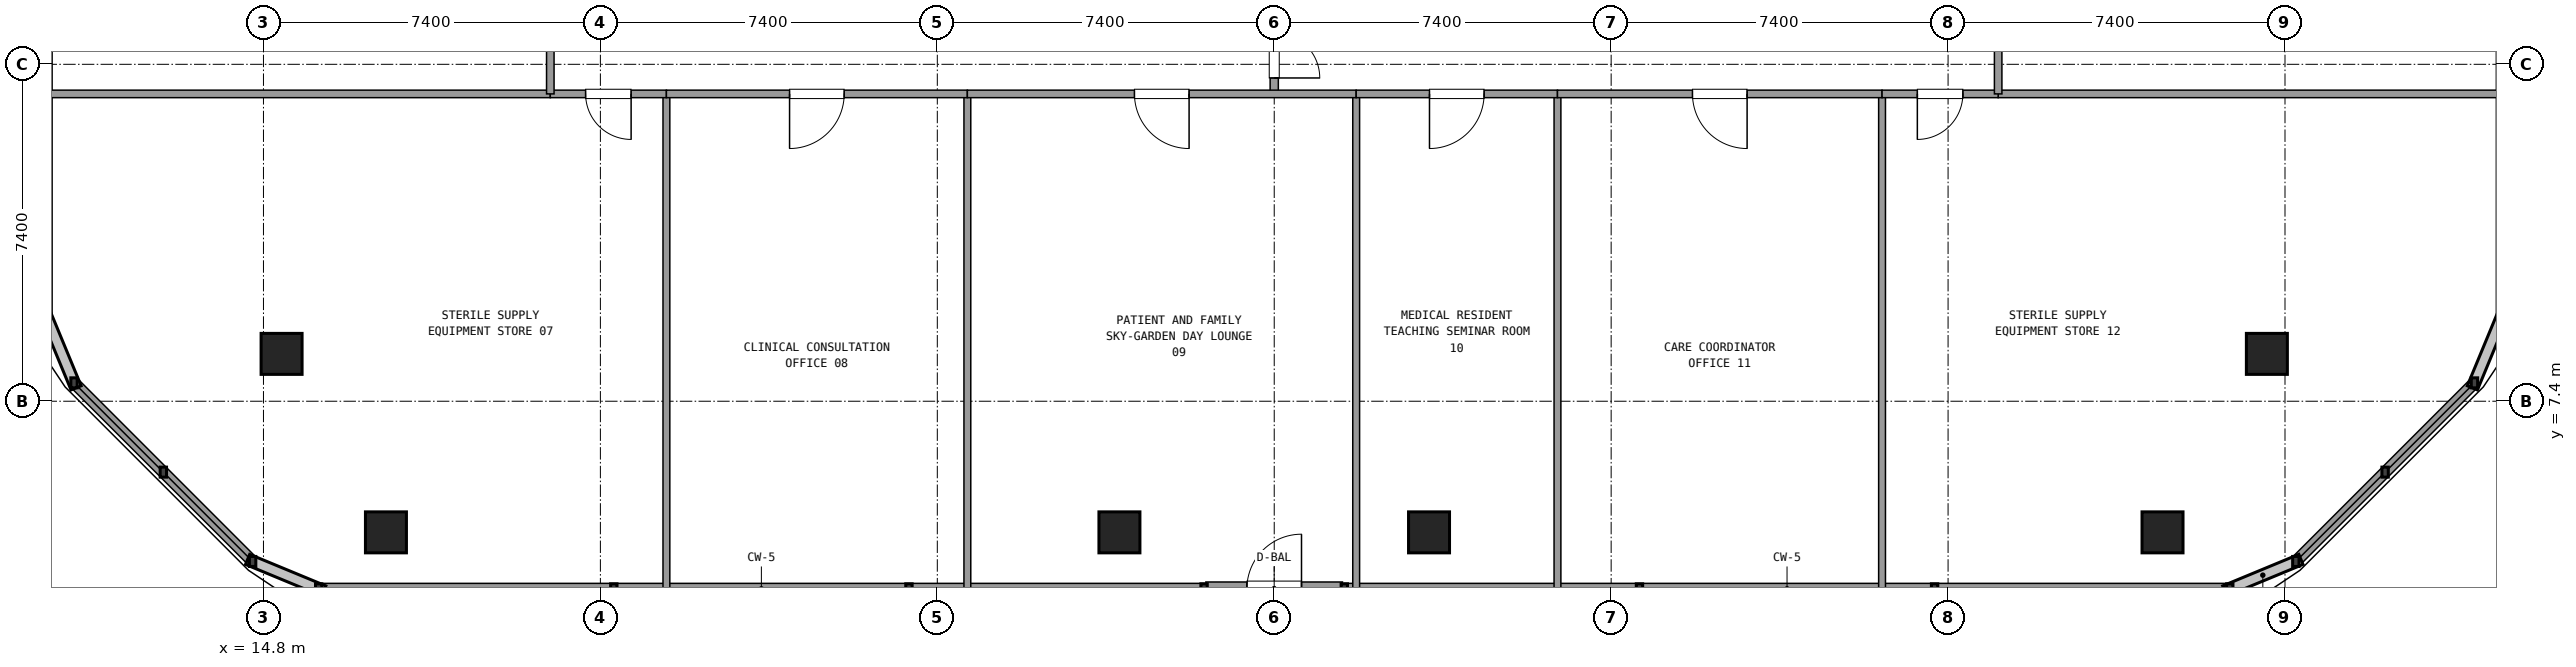
"""IFC4 building model, lengths in metres.
Left out: names, types, materials, properties, quantities, classifications, styles, units other than length and angle.
Written with IfcOpenShell. Run it as: python <this file> out.ifc"""

import sys

from ifc_helpers import new_model, si_unit, direction, frame, frame_2d, origin, origin_2d, place, context, subcontext, project, spatial, rectangle, extrude, element, fill, save


model = new_model("IFC4")
c1 = context("Model", 3, precision=1e-05, world=origin(), true_north=direction((0.0, 1.0)))
c2 = subcontext(c1, "Body", "Model", "MODEL_VIEW")
j1 = project(units=[si_unit("LENGTHUNIT", "METRE"), si_unit("PLANEANGLEUNIT", "RADIAN")], contexts=[c1])
p1 = place(None, origin())
s1 = spatial("IfcSite", under=j1, at=p1, CompositionType="ELEMENT")
p2 = place(p1, origin())
s2 = spatial("IfcBuilding", under=s1, at=p2, CompositionType="ELEMENT")
p3 = place(p2, frame((0.0, 0.0, 228.78)))
s3 = spatial("IfcBuildingStorey", under=s2, at=p3, CompositionType="ELEMENT", Elevation=228.78)
for number, where, z_axis, x_axis in (
    (1, (15.198, 8.44, 0.0), (0.0, 0.0, 1.0), (1.0, 0.0, 0.0)),
    (2, (17.49, 4.52, 0.0), (0.0, 0.0, 1.0), (1.0, 0.0, 0.0)),
    (3, (33.6, 4.52, 0.0), (0.0, 0.0, 1.0), (1.0, 0.0, 0.0)),
    (4, (40.4, 4.52, 0.0), (0.0, 0.0, 1.0), (1.0, 0.0, 0.0)),
    (5, (56.51, 4.52, 0.0), (0.0, 0.0, 1.0), (1.0, 0.0, 0.0)),
    (6, (58.802, 8.44, 0.0), (0.0, 0.0, 1.0), (1.0, 0.0, 0.0)),
):
    element("IfcColumn", number, at=place(p3, frame(where, z_axis=z_axis, x_axis=x_axis)), inside=s3, PredefinedType="COLUMN", context=c2, shape_type="SweptSolid", body=[
        extrude(rectangle(XDim=0.9, YDim=0.9, at=origin_2d()), origin(), (0.0, 0.0, 1.0), 3.6),
    ])
p4 = place(p3, frame((35.499, 3.28, 0.0), z_axis=(0.0, 0.0, 1.0), x_axis=(1.0, 0.0, 0.0)))
e7 = element("IfcWall", 7, at=p4, inside=s3, PredefinedType="SOLIDWALL", context=c2, shape_type="SweptSolid", body=[
    extrude(rectangle(XDim=3.0, YDim=0.3, at=frame_2d((1.5, 0.0))), origin(), (0.0, 0.0, 1.0), 2.67),
])
p5 = place(p4, frame((0.9, 0.0, 0.0)))
e8 = element("IfcOpeningElement", 8, at=p5, cuts=e7, PredefinedType="OPENING", context=c2, shape_type="SweptSolid", body=[
    extrude(rectangle(XDim=1.2, YDim=2.2, at=frame_2d((0.6, 1.1))), frame((0.0, 0.16, 0.0), z_axis=(0.0, -1.0, 0.0), x_axis=(1.0, 0.0, 0.0)), (0.0, 0.0, 1.0), 0.32),
])
p6 = place(p3, frame((16.013, 3.28, 0.0), z_axis=(0.0, 0.0, 1.0), x_axis=(1.0, 0.0, 0.0)))
e9 = element("IfcWall", 9, at=p6, inside=s3, PredefinedType="SOLIDWALL", context=c2, shape_type="SweptSolid", body=[
    extrude(rectangle(XDim=19.446, YDim=0.24, at=frame_2d((9.723, 0.0))), origin(), (0.0, 0.0, 1.0), 0.85),
])
p7 = place(p3, frame((38.539, 3.28, 0.0), z_axis=(0.0, 0.0, 1.0), x_axis=(1.0, 0.0, 0.0)))
e10 = element("IfcWall", 10, at=p7, inside=s3, PredefinedType="SOLIDWALL", context=c2, shape_type="SweptSolid", body=[
    extrude(rectangle(XDim=19.448, YDim=0.24, at=frame_2d((9.724, 0.0))), origin(), (0.0, 0.0, 1.0), 0.85),
])
p8 = place(p3, frame((59.438, 3.881, 0.0), z_axis=(0.0, 0.0, 1.0), x_axis=(0.707128783731, 0.707084777957, 0.0)))
e11 = element("IfcWall", 11, at=p8, inside=s3, PredefinedType="SOLIDWALL", context=c2, shape_type="SweptSolid", body=[
    extrude(rectangle(XDim=5.548, YDim=0.24, at=frame_2d((2.774, 0.0))), origin(), (0.0, 0.0, 1.0), 0.85),
])
p9 = place(p3, frame((63.962, 9.255, 0.0), z_axis=(0.0, 0.0, 1.0), x_axis=(0.0, 1.0, 0.0)))
e12 = element("IfcWall", 12, at=p9, inside=s3, PredefinedType="SOLIDWALL", context=c2, shape_type="SweptSolid", body=[
    extrude(rectangle(XDim=33.29, YDim=0.24, at=frame_2d((16.645, 0.0))), origin(), (0.0, 0.0, 1.0), 0.85),
])
p10 = place(p3, frame((10.038, 24.36, 0.0), z_axis=(0.0, 0.0, 1.0), x_axis=(0.0, -1.0, 0.0)))
e13 = element("IfcWall", 13, at=p10, inside=s3, PredefinedType="SOLIDWALL", context=c2, shape_type="SweptSolid", body=[
    extrude(rectangle(XDim=15.105, YDim=0.24, at=frame_2d((7.553, 0.0))), origin(), (0.0, 0.0, 1.0), 0.85),
])
p11 = place(p3, frame((10.639, 7.804, 0.0), z_axis=(0.0, 0.0, 1.0), x_axis=(0.707128783731, -0.707084777957, 0.0)))
e14 = element("IfcWall", 14, at=p11, inside=s3, PredefinedType="SOLIDWALL", context=c2, shape_type="SweptSolid", body=[
    extrude(rectangle(XDim=5.548, YDim=0.24, at=frame_2d((2.774, 0.0))), origin(), (0.0, 0.0, 1.0), 0.85),
])
p12 = place(p3, frame((37.0, 14.15, 0.0), z_axis=(0.0, 0.0, 1.0), x_axis=(0.0, 1.0, 0.0)))
e15 = element("IfcWall", 15, at=p12, inside=s3, PredefinedType="PARTITIONING", context=c2, shape_type="SweptSolid", body=[
    extrude(rectangle(XDim=2.7, YDim=0.18, at=frame_2d((1.35, 0.0))), origin(), (0.0, 0.0, 1.0), 2.59),
])
p13 = place(p12, frame((0.35, 0.0, 0.0)))
e16 = element("IfcOpeningElement", 16, at=p13, cuts=e15, PredefinedType="OPENING", context=c2, shape_type="SweptSolid", body=[
    extrude(rectangle(XDim=2.0, YDim=2.2, at=frame_2d((1.0, 1.1))), frame((0.0, 0.1, 0.0), z_axis=(0.0, -1.0, 0.0), x_axis=(1.0, 0.0, 0.0)), (0.0, 0.0, 1.0), 0.2),
])
for number, where, z_axis, x_axis in (
    (17, (10.058, 14.15, 0.0), (0.0, 0.0, 1.0), (1.0, 0.0, 0.0)),
    (18, (52.9, 14.15, 0.0), (0.0, 0.0, 1.0), (1.0, 0.0, 0.0)),
):
    element("IfcWall", number, at=place(p3, frame(where, z_axis=z_axis, x_axis=x_axis)), inside=s3, PredefinedType="PARTITIONING", context=c2, shape_type="SweptSolid", body=[
        extrude(rectangle(XDim=11.042, YDim=0.165, at=frame_2d((5.521, 0.0))), origin(), (0.0, 0.0, 1.0), 2.59),
    ])
p14 = place(p3, frame((23.65, 14.15, 0.0), z_axis=(0.0, 0.0, 1.0), x_axis=(0.0, -1.0, 0.0)))
e19 = element("IfcWall", 19, at=p14, inside=s3, PredefinedType="PARTITIONING", context=c2, shape_type="SweptSolid", body=[
    extrude(rectangle(XDim=10.85, YDim=0.15, at=frame_2d((5.425, 0.0))), origin(), (0.0, 0.0, 1.0), 2.59),
])
p15 = place(p3, frame((21.1, 14.15, 0.0), z_axis=(0.0, 0.0, 1.0), x_axis=(1.0, 0.0, 0.0)))
e20 = element("IfcWall", 20, at=p15, inside=s3, PredefinedType="PARTITIONING", context=c2, shape_type="SweptSolid", body=[
    extrude(rectangle(XDim=2.55, YDim=0.165, at=frame_2d((1.275, 0.0))), origin(), (0.0, 0.0, 1.0), 2.59),
])
p16 = place(p15, frame((0.775, 0.0, 0.0)))
e21 = element("IfcOpeningElement", 21, at=p16, cuts=e20, PredefinedType="OPENING", context=c2, shape_type="SweptSolid", body=[
    extrude(rectangle(XDim=1.0, YDim=2.15, at=frame_2d((0.5, 1.075))), frame((0.0, 0.093, 0.0), z_axis=(0.0, -1.0, 0.0), x_axis=(1.0, 0.0, 0.0)), (0.0, 0.0, 1.0), 0.185),
])
p17 = place(p3, frame((30.26, 14.15, 0.0), z_axis=(0.0, 0.0, 1.0), x_axis=(0.0, -1.0, 0.0)))
e22 = element("IfcWall", 22, at=p17, inside=s3, PredefinedType="PARTITIONING", context=c2, shape_type="SweptSolid", body=[
    extrude(rectangle(XDim=10.85, YDim=0.15, at=frame_2d((5.425, 0.0))), origin(), (0.0, 0.0, 1.0), 2.59),
])
p18 = place(p3, frame((23.65, 14.15, 0.0), z_axis=(0.0, 0.0, 1.0), x_axis=(1.0, 0.0, 0.0)))
e23 = element("IfcWall", 23, at=p18, inside=s3, PredefinedType="PARTITIONING", context=c2, shape_type="SweptSolid", body=[
    extrude(rectangle(XDim=6.61, YDim=0.165, at=frame_2d((3.305, 0.0))), origin(), (0.0, 0.0, 1.0), 2.59),
])
p19 = place(p18, frame((2.705, 0.0, 0.0)))
e24 = element("IfcOpeningElement", 24, at=p19, cuts=e23, PredefinedType="OPENING", context=c2, shape_type="SweptSolid", body=[
    extrude(rectangle(XDim=1.2, YDim=2.15, at=frame_2d((0.6, 1.075))), frame((0.0, 0.093, 0.0), z_axis=(0.0, -1.0, 0.0), x_axis=(1.0, 0.0, 0.0)), (0.0, 0.0, 1.0), 0.185),
])
p20 = place(p3, frame((38.8, 14.15, 0.0), z_axis=(0.0, 0.0, 1.0), x_axis=(0.0, -1.0, 0.0)))
e25 = element("IfcWall", 25, at=p20, inside=s3, PredefinedType="PARTITIONING", context=c2, shape_type="SweptSolid", body=[
    extrude(rectangle(XDim=10.85, YDim=0.15, at=frame_2d((5.425, 0.0))), origin(), (0.0, 0.0, 1.0), 2.59),
])
p21 = place(p3, frame((30.26, 14.15, 0.0), z_axis=(0.0, 0.0, 1.0), x_axis=(1.0, 0.0, 0.0)))
e26 = element("IfcWall", 26, at=p21, inside=s3, PredefinedType="PARTITIONING", context=c2, shape_type="SweptSolid", body=[
    extrude(rectangle(XDim=8.54, YDim=0.165, at=frame_2d((4.27, 0.0))), origin(), (0.0, 0.0, 1.0), 2.59),
])
p22 = place(p21, frame((3.67, 0.0, 0.0)))
e27 = element("IfcOpeningElement", 27, at=p22, cuts=e26, PredefinedType="OPENING", context=c2, shape_type="SweptSolid", body=[
    extrude(rectangle(XDim=1.2, YDim=2.15, at=frame_2d((0.6, 1.075))), frame((0.0, 0.093, 0.0), z_axis=(0.0, -1.0, 0.0), x_axis=(1.0, 0.0, 0.0)), (0.0, 0.0, 1.0), 0.185),
])
p23 = place(p3, frame((43.221, 14.15, 0.0), z_axis=(0.0, 0.0, 1.0), x_axis=(0.0, -1.0, 0.0)))
e28 = element("IfcWall", 28, at=p23, inside=s3, PredefinedType="PARTITIONING", context=c2, shape_type="SweptSolid", body=[
    extrude(rectangle(XDim=10.85, YDim=0.15, at=frame_2d((5.425, 0.0))), origin(), (0.0, 0.0, 1.0), 2.59),
])
p24 = place(p3, frame((38.8, 14.15, 0.0), z_axis=(0.0, 0.0, 1.0), x_axis=(1.0, 0.0, 0.0)))
e29 = element("IfcWall", 29, at=p24, inside=s3, PredefinedType="PARTITIONING", context=c2, shape_type="SweptSolid", body=[
    extrude(rectangle(XDim=4.421, YDim=0.165, at=frame_2d((2.21, 0.0))), origin(), (0.0, 0.0, 1.0), 2.59),
])
p25 = place(p24, frame((1.61, 0.0, 0.0)))
e30 = element("IfcOpeningElement", 30, at=p25, cuts=e29, PredefinedType="OPENING", context=c2, shape_type="SweptSolid", body=[
    extrude(rectangle(XDim=1.2, YDim=2.15, at=frame_2d((0.6, 1.075))), frame((0.0, 0.093, 0.0), z_axis=(0.0, -1.0, 0.0), x_axis=(1.0, 0.0, 0.0)), (0.0, 0.0, 1.0), 0.185),
])
p26 = place(p3, frame((50.35, 14.15, 0.0), z_axis=(0.0, 0.0, 1.0), x_axis=(0.0, -1.0, 0.0)))
e31 = element("IfcWall", 31, at=p26, inside=s3, PredefinedType="PARTITIONING", context=c2, shape_type="SweptSolid", body=[
    extrude(rectangle(XDim=10.85, YDim=0.15, at=frame_2d((5.425, 0.0))), origin(), (0.0, 0.0, 1.0), 2.59),
])
p27 = place(p3, frame((43.221, 14.15, 0.0), z_axis=(0.0, 0.0, 1.0), x_axis=(1.0, 0.0, 0.0)))
e32 = element("IfcWall", 32, at=p27, inside=s3, PredefinedType="PARTITIONING", context=c2, shape_type="SweptSolid", body=[
    extrude(rectangle(XDim=7.129, YDim=0.165, at=frame_2d((3.564, 0.0))), origin(), (0.0, 0.0, 1.0), 2.59),
])
p28 = place(p27, frame((2.965, 0.0, 0.0)))
e33 = element("IfcOpeningElement", 33, at=p28, cuts=e32, PredefinedType="OPENING", context=c2, shape_type="SweptSolid", body=[
    extrude(rectangle(XDim=1.2, YDim=2.15, at=frame_2d((0.6, 1.075))), frame((0.0, 0.093, 0.0), z_axis=(0.0, -1.0, 0.0), x_axis=(1.0, 0.0, 0.0)), (0.0, 0.0, 1.0), 0.185),
])
p29 = place(p3, frame((50.35, 14.15, 0.0), z_axis=(0.0, 0.0, 1.0), x_axis=(1.0, 0.0, 0.0)))
e34 = element("IfcWall", 34, at=p29, inside=s3, PredefinedType="PARTITIONING", context=c2, shape_type="SweptSolid", body=[
    extrude(rectangle(XDim=2.55, YDim=0.165, at=frame_2d((1.275, 0.0))), origin(), (0.0, 0.0, 1.0), 2.59),
])
p30 = place(p29, frame((0.775, 0.0, 0.0)))
e35 = element("IfcOpeningElement", 35, at=p30, cuts=e34, PredefinedType="OPENING", context=c2, shape_type="SweptSolid", body=[
    extrude(rectangle(XDim=1.0, YDim=2.15, at=frame_2d((0.5, 1.075))), frame((0.0, 0.093, 0.0), z_axis=(0.0, -1.0, 0.0), x_axis=(1.0, 0.0, 0.0)), (0.0, 0.0, 1.0), 0.185),
])
p31 = place(p3, frame((21.1, 14.15, 0.0), z_axis=(0.0, 0.0, 1.0), x_axis=(0.0, 1.0, 0.0)))
e36 = element("IfcWall", 36, at=p31, inside=s3, PredefinedType="PARTITIONING", context=c2, shape_type="SweptSolid", body=[
    extrude(rectangle(XDim=9.95, YDim=0.165, at=frame_2d((4.975, 0.0))), origin(), (0.0, 0.0, 1.0), 2.59),
])
p32 = place(p31, frame((4.375, 0.0, 0.0)))
e37 = element("IfcOpeningElement", 37, at=p32, cuts=e36, PredefinedType="OPENING", context=c2, shape_type="SweptSolid", body=[
    extrude(rectangle(XDim=1.2, YDim=2.15, at=frame_2d((0.6, 1.075))), frame((0.0, 0.093, 0.0), z_axis=(0.0, -1.0, 0.0), x_axis=(1.0, 0.0, 0.0)), (0.0, 0.0, 1.0), 0.185),
])
p33 = place(p3, frame((52.9, 14.15, 0.0), z_axis=(0.0, 0.0, 1.0), x_axis=(0.0, 1.0, 0.0)))
e38 = element("IfcWall", 38, at=p33, inside=s3, PredefinedType="PARTITIONING", context=c2, shape_type="SweptSolid", body=[
    extrude(rectangle(XDim=5.405, YDim=0.165, at=frame_2d((2.703, 0.0))), origin(), (0.0, 0.0, 1.0), 2.59),
])
p34 = place(p33, frame((2.102, 0.0, 0.0)))
e39 = element("IfcOpeningElement", 39, at=p34, cuts=e38, PredefinedType="OPENING", context=c2, shape_type="SweptSolid", body=[
    extrude(rectangle(XDim=1.2, YDim=2.15, at=frame_2d((0.6, 1.075))), frame((0.0, 0.093, 0.0), z_axis=(0.0, -1.0, 0.0), x_axis=(1.0, 0.0, 0.0)), (0.0, 0.0, 1.0), 0.185),
])
p35 = place(p13, frame((2.0, 0.0, 0.0), z_axis=(0.0, 0.0, 1.0), x_axis=(-1.0, 0.0, 0.0)))
e40 = element("IfcDoor", 40, at=p35, inside=s3, OperationType="DOUBLE_DOOR_SINGLE_SWING", PredefinedType="DOOR", context=c2, shape_type="SweptSolid", body=[
    extrude(rectangle(XDim=2.0, YDim=2.2, at=frame_2d((1.0, 1.1))), frame((0.0, 0.025, 0.0), z_axis=(0.0, -1.0, 0.0), x_axis=(1.0, 0.0, 0.0)), (0.0, 0.0, 1.0), 0.05),
])
fill(e16, e40)
p36 = place(p16, frame((1.0, 0.0, 0.0), z_axis=(0.0, 0.0, 1.0), x_axis=(-1.0, 0.0, 0.0)))
e41 = element("IfcDoor", 41, at=p36, inside=s3, OperationType="SINGLE_SWING_RIGHT", PredefinedType="DOOR", context=c2, shape_type="SweptSolid", body=[
    extrude(rectangle(XDim=1.0, YDim=2.15, at=frame_2d((0.5, 1.075))), frame((0.0, 0.025, 0.0), z_axis=(0.0, -1.0, 0.0), x_axis=(1.0, 0.0, 0.0)), (0.0, 0.0, 1.0), 0.05),
])
fill(e21, e41)
p37 = place(p19, frame((1.2, 0.0, 0.0), z_axis=(0.0, 0.0, 1.0), x_axis=(-1.0, 0.0, 0.0)))
e42 = element("IfcDoor", 42, at=p37, inside=s3, OperationType="SINGLE_SWING_LEFT", PredefinedType="DOOR", context=c2, shape_type="SweptSolid", body=[
    extrude(rectangle(XDim=1.2, YDim=2.15, at=frame_2d((0.6, 1.075))), frame((0.0, 0.025, 0.0), z_axis=(0.0, -1.0, 0.0), x_axis=(1.0, 0.0, 0.0)), (0.0, 0.0, 1.0), 0.05),
])
fill(e24, e42)
p38 = place(p22, frame((1.2, 0.0, 0.0), z_axis=(0.0, 0.0, 1.0), x_axis=(-1.0, 0.0, 0.0)))
e43 = element("IfcDoor", 43, at=p38, inside=s3, OperationType="SINGLE_SWING_RIGHT", PredefinedType="DOOR", context=c2, shape_type="SweptSolid", body=[
    extrude(rectangle(XDim=1.2, YDim=2.15, at=frame_2d((0.6, 1.075))), frame((0.0, 0.025, 0.0), z_axis=(0.0, -1.0, 0.0), x_axis=(1.0, 0.0, 0.0)), (0.0, 0.0, 1.0), 0.05),
])
fill(e27, e43)
p39 = place(p25, frame((1.2, 0.0, 0.0), z_axis=(0.0, 0.0, 1.0), x_axis=(-1.0, 0.0, 0.0)))
e44 = element("IfcDoor", 44, at=p39, inside=s3, OperationType="SINGLE_SWING_LEFT", PredefinedType="DOOR", context=c2, shape_type="SweptSolid", body=[
    extrude(rectangle(XDim=1.2, YDim=2.15, at=frame_2d((0.6, 1.075))), frame((0.0, 0.025, 0.0), z_axis=(0.0, -1.0, 0.0), x_axis=(1.0, 0.0, 0.0)), (0.0, 0.0, 1.0), 0.05),
])
fill(e30, e44)
p40 = place(p28, frame((1.2, 0.0, 0.0), z_axis=(0.0, 0.0, 1.0), x_axis=(-1.0, 0.0, 0.0)))
e45 = element("IfcDoor", 45, at=p40, inside=s3, OperationType="SINGLE_SWING_RIGHT", PredefinedType="DOOR", context=c2, shape_type="SweptSolid", body=[
    extrude(rectangle(XDim=1.2, YDim=2.15, at=frame_2d((0.6, 1.075))), frame((0.0, 0.025, 0.0), z_axis=(0.0, -1.0, 0.0), x_axis=(1.0, 0.0, 0.0)), (0.0, 0.0, 1.0), 0.05),
])
fill(e33, e45)
p41 = place(p30, frame((1.0, 0.0, 0.0), z_axis=(0.0, 0.0, 1.0), x_axis=(-1.0, 0.0, 0.0)))
e46 = element("IfcDoor", 46, at=p41, inside=s3, OperationType="SINGLE_SWING_LEFT", PredefinedType="DOOR", context=c2, shape_type="SweptSolid", body=[
    extrude(rectangle(XDim=1.0, YDim=2.15, at=frame_2d((0.5, 1.075))), frame((0.0, 0.025, 0.0), z_axis=(0.0, -1.0, 0.0), x_axis=(1.0, 0.0, 0.0)), (0.0, 0.0, 1.0), 0.05),
])
fill(e35, e46)
save(model, sys.argv[1])
